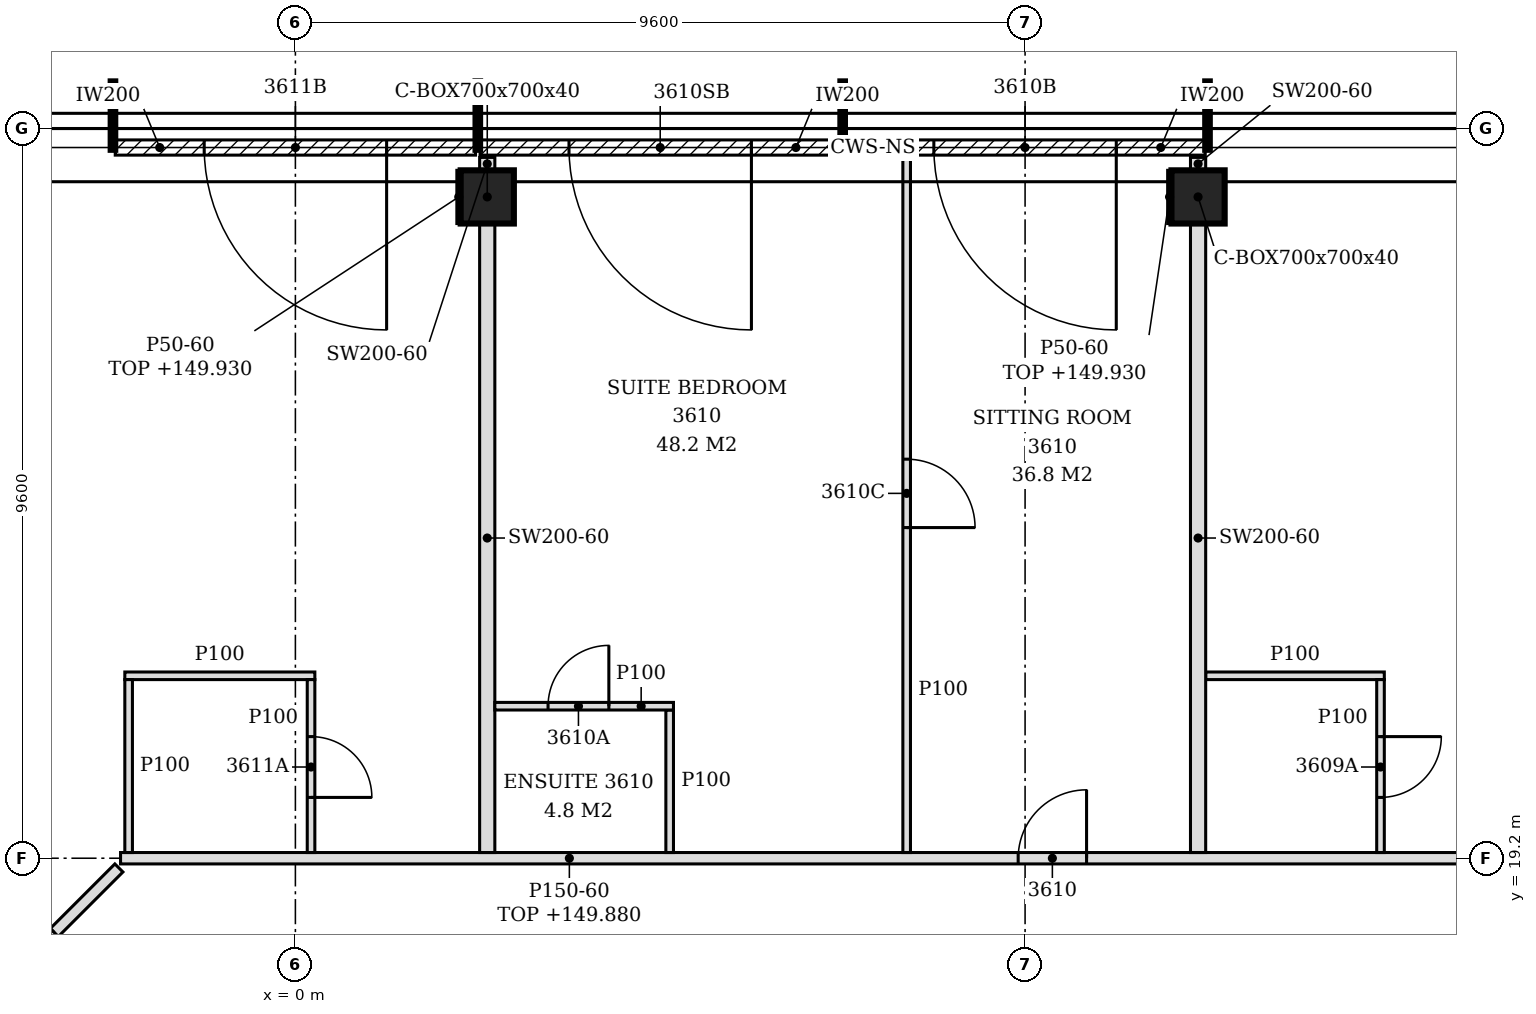
"""IFC4 building model, lengths in metres.
Left out: names, types, materials, properties, quantities, classifications, styles, units other than length and angle.
Written with IfcOpenShell. Run it as: python <this file> out.ifc"""

import sys

from ifc_helpers import new_model, si_unit, direction, frame, frame_2d, origin, origin_2d, place, context, subcontext, project, spatial, polyline, rectangle, hollow_rectangle, outline, extrude, element, fill, save


model = new_model("IFC4")
c1 = context("Model", 3, precision=1e-05, world=origin(), true_north=direction((0.0, 1.0)))
c2 = subcontext(c1, "Body", "Model", "MODEL_VIEW")
j1 = project(units=[si_unit("LENGTHUNIT", "METRE"), si_unit("PLANEANGLEUNIT", "RADIAN")], contexts=[c1])
p1 = place(None, origin())
s1 = spatial("IfcSite", under=j1, at=p1, CompositionType="ELEMENT")
p2 = place(p1, origin())
s2 = spatial("IfcBuilding", under=s1, at=p2, CompositionType="ELEMENT")
p3 = place(p2, frame((0.0, 0.0, 147.0)))
s3 = spatial("IfcBuildingStorey", under=s2, at=p3, CompositionType="ELEMENT", Elevation=147.0)
for number, where, z_axis, x_axis in (
    (1, (11.876, 27.9, -0.15), (0.0, 0.0, 1.0), (1.0, 0.0, 0.0)),
    (2, (2.524, 27.9, -0.15), (0.0, 0.0, 1.0), (1.0, 0.0, 0.0)),
):
    element("IfcColumn", number, at=place(p3, frame(where, z_axis=z_axis, x_axis=x_axis)), inside=s3, PredefinedType="COLUMN", context=c2, shape_type="SweptSolid", body=[
        extrude(hollow_rectangle(XDim=0.7, YDim=0.7, WallThickness=0.04, at=origin_2d()), origin(), (0.0, 0.0, 1.0), 3.6),
    ])
p4 = place(p3, frame((11.97, 28.55, 0.0), z_axis=(0.0, 0.0, 1.0), x_axis=(-1.0, 0.0, 0.0)))
e3 = element("IfcWall", 3, at=p4, inside=s3, PredefinedType="NOTDEFINED", context=c2, shape_type="SweptSolid", body=[
    extrude(rectangle(XDim=4.74, YDim=0.2, at=frame_2d((2.37, 0.0))), origin(), (0.0, 0.0, 1.0), 3.45),
])
p5 = place(p4, frame((1.17, 0.0, 0.0)))
e4 = element("IfcOpeningElement", 4, at=p5, cuts=e3, PredefinedType="OPENING", context=c2, shape_type="SweptSolid", body=[
    extrude(rectangle(XDim=2.4, YDim=2.4, at=frame_2d((1.2, 1.2))), frame((0.0, 0.11, 0.0), z_axis=(0.0, -1.0, 0.0), x_axis=(1.0, 0.0, 0.0)), (0.0, 0.0, 1.0), 0.22),
])
p6 = place(p3, frame((7.17, 28.55, 0.0), z_axis=(0.0, 0.0, 1.0), x_axis=(-1.0, 0.0, 0.0)))
e5 = element("IfcWall", 5, at=p6, inside=s3, PredefinedType="NOTDEFINED", context=c2, shape_type="SweptSolid", body=[
    extrude(rectangle(XDim=4.74, YDim=0.2, at=frame_2d((2.37, 0.0))), origin(), (0.0, 0.0, 1.0), 3.45),
])
p7 = place(p6, frame((1.17, 0.0, 0.0)))
e6 = element("IfcOpeningElement", 6, at=p7, cuts=e5, PredefinedType="OPENING", context=c2, shape_type="SweptSolid", body=[
    extrude(rectangle(XDim=2.4, YDim=2.4, at=frame_2d((1.2, 1.2))), frame((0.0, 0.11, 0.0), z_axis=(0.0, -1.0, 0.0), x_axis=(1.0, 0.0, 0.0)), (0.0, 0.0, 1.0), 0.22),
])
p8 = place(p3, frame((2.37, 28.55, 0.0), z_axis=(0.0, 0.0, 1.0), x_axis=(-1.0, 0.0, 0.0)))
e7 = element("IfcWall", 7, at=p8, inside=s3, PredefinedType="NOTDEFINED", context=c2, shape_type="SweptSolid", body=[
    extrude(rectangle(XDim=4.74, YDim=0.2, at=frame_2d((2.37, 0.0))), origin(), (0.0, 0.0, 1.0), 3.45),
])
p9 = place(p8, frame((1.17, 0.0, 0.0)))
e8 = element("IfcOpeningElement", 8, at=p9, cuts=e7, PredefinedType="OPENING", context=c2, shape_type="SweptSolid", body=[
    extrude(rectangle(XDim=2.4, YDim=2.4, at=frame_2d((1.2, 1.2))), frame((0.0, 0.11, 0.0), z_axis=(0.0, -1.0, 0.0), x_axis=(1.0, 0.0, 0.0)), (0.0, 0.0, 1.0), 0.22),
])
p10 = place(p3, frame((-12.075, 9.319, 0.0), z_axis=(0.0, 0.0, 1.0), x_axis=(0.707106781187, 0.707106781187, 0.0)))
e9 = element("IfcWall", 9, at=p10, inside=s3, PredefinedType="PARTITIONING", context=c2, shape_type="SweptSolid", body=[
    extrude(rectangle(XDim=13.793, YDim=0.15, at=frame_2d((6.896, 0.0))), origin(), (0.0, 0.0, 1.0), 2.73),
])
p11 = place(p10, frame((11.692, 0.0, 0.0)))
e10 = element("IfcOpeningElement", 10, at=p11, cuts=e9, PredefinedType="OPENING", context=c2, shape_type="SweptSolid", body=[
    extrude(rectangle(XDim=0.9, YDim=2.1, at=frame_2d((0.45, 1.05))), frame((0.0, 0.085, 0.0), z_axis=(0.0, -1.0, 0.0), x_axis=(1.0, 0.0, 0.0)), (0.0, 0.0, 1.0), 0.17),
])
p12 = place(p10, frame((7.376, 0.0, 0.0)))
e11 = element("IfcOpeningElement", 11, at=p12, cuts=e9, PredefinedType="OPENING", context=c2, shape_type="SweptSolid", body=[
    extrude(rectangle(XDim=0.9, YDim=2.1, at=frame_2d((0.45, 1.05))), frame((0.0, 0.085, 0.0), z_axis=(0.0, -1.0, 0.0), x_axis=(1.0, 0.0, 0.0)), (0.0, 0.0, 1.0), 0.17),
])
p13 = place(p10, frame((3.62, 0.0, 0.0)))
e12 = element("IfcOpeningElement", 12, at=p13, cuts=e9, PredefinedType="OPENING", context=c2, shape_type="SweptSolid", body=[
    extrude(rectangle(XDim=0.9, YDim=2.1, at=frame_2d((0.45, 1.05))), frame((0.0, 0.085, 0.0), z_axis=(0.0, -1.0, 0.0), x_axis=(1.0, 0.0, 0.0)), (0.0, 0.0, 1.0), 0.17),
])
p14 = place(p3, frame((-2.3, 19.2, 0.0), z_axis=(0.0, 0.0, 1.0), x_axis=(1.0, 0.0, 0.0)))
e13 = element("IfcWall", 13, at=p14, inside=s3, PredefinedType="PARTITIONING", context=c2, shape_type="SweptSolid", body=[
    extrude(outline(polyline([(0.0, 0.0), (19.0, 0.0), (19.0, 2.88), (9.65, 2.88), (9.648, 2.73), (9.35, 2.73), (9.348, 2.88), (0.0, 2.88), (0.0, 0.0)])), frame((0.0, 0.075, 0.0), z_axis=(0.0, -1.0, 0.0), x_axis=(1.0, 0.0, 0.0)), (0.0, 0.0, 1.0), 0.15),
])
p15 = place(p14, frame((11.809, 0.0, 0.0)))
e14 = element("IfcOpeningElement", 14, at=p15, cuts=e13, PredefinedType="OPENING", context=c2, shape_type="SweptSolid", body=[
    extrude(rectangle(XDim=0.9, YDim=2.1, at=frame_2d((0.45, 1.05))), frame((0.0, 0.085, 0.0), z_axis=(0.0, -1.0, 0.0), x_axis=(1.0, 0.0, 0.0)), (0.0, 0.0, 1.0), 0.17),
])
p16 = place(p3, frame((-2.194, 19.275, 0.0), z_axis=(0.0, 0.0, 1.0), x_axis=(0.0, 1.0, 0.0)))
e15 = element("IfcWall", 15, at=p16, inside=s3, PredefinedType="PARTITIONING", context=c2, shape_type="SweptSolid", body=[
    extrude(outline(polyline([(0.0, 0.0), (2.275, 0.0), (2.275, 3.45), (0.03, 3.45), (0.028, 2.88), (0.0, 2.88), (0.0, 0.0)])), frame((0.0, 0.05, 0.0), z_axis=(0.0, -1.0, 0.0), x_axis=(1.0, 0.0, 0.0)), (0.0, 0.0, 1.0), 0.1),
])
p17 = place(p3, frame((0.206, 19.275, 0.0), z_axis=(0.0, 0.0, 1.0), x_axis=(0.0, 1.0, 0.0)))
e16 = element("IfcWall", 16, at=p17, inside=s3, PredefinedType="PARTITIONING", context=c2, shape_type="SweptSolid", body=[
    extrude(outline(polyline([(0.0, 0.0), (2.275, 0.0), (2.275, 3.45), (0.03, 3.45), (0.028, 2.88), (0.0, 2.88), (0.0, 0.0)])), frame((0.0, 0.05, 0.0), z_axis=(0.0, -1.0, 0.0), x_axis=(1.0, 0.0, 0.0)), (0.0, 0.0, 1.0), 0.1),
])
p18 = place(p17, frame((0.725, 0.0, 0.0)))
e17 = element("IfcOpeningElement", 17, at=p18, cuts=e16, PredefinedType="OPENING", context=c2, shape_type="SweptSolid", body=[
    extrude(rectangle(XDim=0.8, YDim=2.1, at=frame_2d((0.4, 1.05))), frame((0.0, 0.06, 0.0), z_axis=(0.0, -1.0, 0.0), x_axis=(1.0, 0.0, 0.0)), (0.0, 0.0, 1.0), 0.12),
])
p19 = place(p3, frame((2.524, 19.275, 0.0), z_axis=(0.0, 0.0, 1.0), x_axis=(0.0, 1.0, 0.0)))
e18 = element("IfcWall", 18, at=p19, inside=s3, PredefinedType="PARTITIONING", context=c2, shape_type="SweptSolid", body=[
    extrude(outline(polyline([(0.0, 0.0), (8.275, 0.0), (8.275, 3.45), (4.83, 3.45), (4.828, 2.88), (4.62, 2.88), (4.618, 3.45), (0.03, 3.45), (0.028, 2.88), (0.0, 2.88), (0.0, 0.0)])), frame((0.0, 0.1, 0.0), z_axis=(0.0, -1.0, 0.0), x_axis=(1.0, 0.0, 0.0)), (0.0, 0.0, 1.0), 0.2),
])
p20 = place(p3, frame((4.924, 19.275, 0.0), z_axis=(0.0, 0.0, 1.0), x_axis=(0.0, 1.0, 0.0)))
e19 = element("IfcWall", 19, at=p20, inside=s3, PredefinedType="PARTITIONING", context=c2, shape_type="SweptSolid", body=[
    extrude(outline(polyline([(0.0, 0.0), (1.875, 0.0), (1.875, 3.45), (0.03, 3.45), (0.028, 2.88), (0.0, 2.88), (0.0, 0.0)])), frame((0.0, 0.05, 0.0), z_axis=(0.0, -1.0, 0.0), x_axis=(1.0, 0.0, 0.0)), (0.0, 0.0, 1.0), 0.1),
])
p21 = place(p3, frame((8.042, 19.275, 0.0), z_axis=(0.0, 0.0, 1.0), x_axis=(0.0, 1.0, 0.0)))
e20 = element("IfcWall", 20, at=p21, inside=s3, PredefinedType="PARTITIONING", context=c2, shape_type="SweptSolid", body=[
    extrude(outline(polyline([(0.0, 0.0), (9.145, 0.0), (9.145, 3.45), (8.775, 3.45), (8.773, 2.93), (8.475, 2.93), (8.473, 3.45), (4.83, 3.45), (4.828, 2.88), (4.62, 2.88), (4.618, 3.45), (0.03, 3.45), (0.028, 2.88), (0.0, 2.88), (0.0, 0.0)])), frame((0.0, 0.05, 0.0), z_axis=(0.0, -1.0, 0.0), x_axis=(1.0, 0.0, 0.0)), (0.0, 0.0, 1.0), 0.1),
])
p22 = place(p21, frame((4.275, 0.0, 0.0)))
e21 = element("IfcOpeningElement", 21, at=p22, cuts=e20, PredefinedType="OPENING", context=c2, shape_type="SweptSolid", body=[
    extrude(rectangle(XDim=0.9, YDim=2.1, at=frame_2d((0.45, 1.05))), frame((0.0, 0.06, 0.0), z_axis=(0.0, -1.0, 0.0), x_axis=(1.0, 0.0, 0.0)), (0.0, 0.0, 1.0), 0.12),
])
p23 = place(p3, frame((11.876, 19.275, 0.0), z_axis=(0.0, 0.0, 1.0), x_axis=(0.0, 1.0, 0.0)))
e22 = element("IfcWall", 22, at=p23, inside=s3, PredefinedType="PARTITIONING", context=c2, shape_type="SweptSolid", body=[
    extrude(outline(polyline([(0.0, 0.0), (8.275, 0.0), (8.275, 3.45), (4.83, 3.45), (4.828, 2.88), (4.62, 2.88), (4.618, 3.45), (0.03, 3.45), (0.028, 2.88), (0.0, 2.88), (0.0, 0.0)])), frame((0.0, 0.1, 0.0), z_axis=(0.0, -1.0, 0.0), x_axis=(1.0, 0.0, 0.0)), (0.0, 0.0, 1.0), 0.2),
])
p24 = place(p3, frame((14.276, 19.275, 0.0), z_axis=(0.0, 0.0, 1.0), x_axis=(0.0, 1.0, 0.0)))
e23 = element("IfcWall", 23, at=p24, inside=s3, PredefinedType="PARTITIONING", context=c2, shape_type="SweptSolid", body=[
    extrude(outline(polyline([(0.0, 0.0), (2.275, 0.0), (2.275, 3.45), (0.03, 3.45), (0.028, 2.88), (0.0, 2.88), (0.0, 0.0)])), frame((0.0, 0.05, 0.0), z_axis=(0.0, -1.0, 0.0), x_axis=(1.0, 0.0, 0.0)), (0.0, 0.0, 1.0), 0.1),
])
p25 = place(p24, frame((0.725, 0.0, 0.0)))
e24 = element("IfcOpeningElement", 24, at=p25, cuts=e23, PredefinedType="OPENING", context=c2, shape_type="SweptSolid", body=[
    extrude(rectangle(XDim=0.8, YDim=2.1, at=frame_2d((0.4, 1.05))), frame((0.0, 0.06, 0.0), z_axis=(0.0, -1.0, 0.0), x_axis=(1.0, 0.0, 0.0)), (0.0, 0.0, 1.0), 0.12),
])
p26 = place(p3, frame((2.624, 21.2, 0.0), z_axis=(0.0, 0.0, 1.0), x_axis=(1.0, 0.0, 0.0)))
e25 = element("IfcWall", 25, at=p26, inside=s3, PredefinedType="PARTITIONING", context=c2, shape_type="SweptSolid", body=[
    extrude(rectangle(XDim=2.35, YDim=0.1, at=frame_2d((1.175, 0.0))), origin(), (0.0, 0.0, 1.0), 3.45),
])
p27 = place(p26, frame((0.7, 0.0, 0.0)))
e26 = element("IfcOpeningElement", 26, at=p27, cuts=e25, PredefinedType="OPENING", context=c2, shape_type="SweptSolid", body=[
    extrude(rectangle(XDim=0.8, YDim=2.1, at=frame_2d((0.4, 1.05))), frame((0.0, 0.06, 0.0), z_axis=(0.0, -1.0, 0.0), x_axis=(1.0, 0.0, 0.0)), (0.0, 0.0, 1.0), 0.12),
])
p28 = place(p3, frame((-2.244, 21.6, 0.0), z_axis=(0.0, 0.0, 1.0), x_axis=(1.0, 0.0, 0.0)))
e27 = element("IfcWall", 27, at=p28, inside=s3, PredefinedType="PARTITIONING", context=c2, shape_type="SweptSolid", body=[
    extrude(rectangle(XDim=2.5, YDim=0.1, at=frame_2d((1.25, 0.0))), origin(), (0.0, 0.0, 1.0), 3.45),
])
p29 = place(p3, frame((11.976, 21.6, 0.0), z_axis=(0.0, 0.0, 1.0), x_axis=(1.0, 0.0, 0.0)))
e28 = element("IfcWall", 28, at=p29, inside=s3, PredefinedType="PARTITIONING", context=c2, shape_type="SweptSolid", body=[
    extrude(rectangle(XDim=2.35, YDim=0.1, at=frame_2d((1.175, 0.0))), origin(), (0.0, 0.0, 1.0), 3.45),
])
for number, where, z_axis, x_axis in (
    (29, (2.524, 28.25, 0.0), (0.0, 0.0, 1.0), (0.0, 1.0, 0.0)),
    (30, (11.876, 28.25, 0.0), (0.0, 0.0, 1.0), (0.0, 1.0, 0.0)),
):
    element("IfcWall", number, at=place(p3, frame(where, z_axis=z_axis, x_axis=x_axis)), inside=s3, PredefinedType="PARTITIONING", context=c2, shape_type="SweptSolid", body=[
        extrude(rectangle(XDim=0.17, YDim=0.2, at=frame_2d((0.085, 0.0))), origin(), (0.0, 0.0, 1.0), 3.45),
    ])
for number, where, z_axis, x_axis in (
    (31, (2.149, 27.55, 0.0), (0.0, 0.0, 1.0), (0.0, 1.0, 0.0)),
    (32, (11.501, 27.55, 0.0), (0.0, 0.0, 1.0), (0.0, 1.0, 0.0)),
):
    element("IfcWall", number, at=place(p3, frame(where, z_axis=z_axis, x_axis=x_axis)), inside=s3, PredefinedType="PARTITIONING", context=c2, shape_type="SweptSolid", body=[
        extrude(rectangle(XDim=0.7, YDim=0.05, at=frame_2d((0.35, 0.0))), origin(), (0.0, 0.0, 1.0), 2.93),
    ])
p30 = place(p5, origin())
e33 = element("IfcDoor", 33, at=p30, inside=s3, OperationType="SINGLE_SWING_LEFT", PredefinedType="DOOR", context=c2, shape_type="SweptSolid", body=[
    extrude(rectangle(XDim=2.4, YDim=2.4, at=frame_2d((1.2, 1.2))), frame((0.0, 0.025, 0.0), z_axis=(0.0, -1.0, 0.0), x_axis=(1.0, 0.0, 0.0)), (0.0, 0.0, 1.0), 0.05),
])
fill(e4, e33)
p31 = place(p7, origin())
e34 = element("IfcDoor", 34, at=p31, inside=s3, OperationType="SINGLE_SWING_LEFT", PredefinedType="DOOR", context=c2, shape_type="SweptSolid", body=[
    extrude(rectangle(XDim=2.4, YDim=2.4, at=frame_2d((1.2, 1.2))), frame((0.0, 0.025, 0.0), z_axis=(0.0, -1.0, 0.0), x_axis=(1.0, 0.0, 0.0)), (0.0, 0.0, 1.0), 0.05),
])
fill(e6, e34)
p32 = place(p9, origin())
e35 = element("IfcDoor", 35, at=p32, inside=s3, OperationType="SINGLE_SWING_LEFT", PredefinedType="DOOR", context=c2, shape_type="SweptSolid", body=[
    extrude(rectangle(XDim=2.4, YDim=2.4, at=frame_2d((1.2, 1.2))), frame((0.0, 0.025, 0.0), z_axis=(0.0, -1.0, 0.0), x_axis=(1.0, 0.0, 0.0)), (0.0, 0.0, 1.0), 0.05),
])
fill(e8, e35)
p33 = place(p25, frame((0.8, 0.0, 0.0), z_axis=(0.0, 0.0, 1.0), x_axis=(-1.0, 0.0, 0.0)))
e36 = element("IfcDoor", 36, at=p33, inside=s3, OperationType="SINGLE_SWING_LEFT", PredefinedType="DOOR", context=c2, shape_type="SweptSolid", body=[
    extrude(rectangle(XDim=0.8, YDim=2.1, at=frame_2d((0.4, 1.05))), frame((0.0, 0.025, 0.0), z_axis=(0.0, -1.0, 0.0), x_axis=(1.0, 0.0, 0.0)), (0.0, 0.0, 1.0), 0.05),
])
fill(e24, e36)
p34 = place(p15, origin())
e37 = element("IfcDoor", 37, at=p34, inside=s3, OperationType="SINGLE_SWING_RIGHT", PredefinedType="DOOR", context=c2, shape_type="SweptSolid", body=[
    extrude(rectangle(XDim=0.9, YDim=2.1, at=frame_2d((0.45, 1.05))), frame((0.0, 0.025, 0.0), z_axis=(0.0, -1.0, 0.0), x_axis=(1.0, 0.0, 0.0)), (0.0, 0.0, 1.0), 0.05),
])
fill(e14, e37)
p35 = place(p22, frame((0.9, 0.0, 0.0), z_axis=(0.0, 0.0, 1.0), x_axis=(-1.0, 0.0, 0.0)))
e38 = element("IfcDoor", 38, at=p35, inside=s3, OperationType="SINGLE_SWING_RIGHT", PredefinedType="DOOR", context=c2, shape_type="SweptSolid", body=[
    extrude(rectangle(XDim=0.9, YDim=2.1, at=frame_2d((0.45, 1.05))), frame((0.0, 0.025, 0.0), z_axis=(0.0, -1.0, 0.0), x_axis=(1.0, 0.0, 0.0)), (0.0, 0.0, 1.0), 0.05),
])
fill(e21, e38)
p36 = place(p27, origin())
e39 = element("IfcDoor", 39, at=p36, inside=s3, OperationType="SINGLE_SWING_RIGHT", PredefinedType="DOOR", context=c2, shape_type="SweptSolid", body=[
    extrude(rectangle(XDim=0.8, YDim=2.1, at=frame_2d((0.4, 1.05))), frame((0.0, 0.025, 0.0), z_axis=(0.0, -1.0, 0.0), x_axis=(1.0, 0.0, 0.0)), (0.0, 0.0, 1.0), 0.05),
])
fill(e26, e39)
p37 = place(p11, origin())
e40 = element("IfcDoor", 40, at=p37, inside=s3, OperationType="SINGLE_SWING_RIGHT", PredefinedType="DOOR", context=c2, shape_type="SweptSolid", body=[
    extrude(rectangle(XDim=0.9, YDim=2.1, at=frame_2d((0.45, 1.05))), frame((0.0, 0.025, 0.0), z_axis=(0.0, -1.0, 0.0), x_axis=(1.0, 0.0, 0.0)), (0.0, 0.0, 1.0), 0.05),
])
fill(e10, e40)
p38 = place(p18, frame((0.8, 0.0, 0.0), z_axis=(0.0, 0.0, 1.0), x_axis=(-1.0, 0.0, 0.0)))
e41 = element("IfcDoor", 41, at=p38, inside=s3, OperationType="SINGLE_SWING_RIGHT", PredefinedType="DOOR", context=c2, shape_type="SweptSolid", body=[
    extrude(rectangle(XDim=0.8, YDim=2.1, at=frame_2d((0.4, 1.05))), frame((0.0, 0.025, 0.0), z_axis=(0.0, -1.0, 0.0), x_axis=(1.0, 0.0, 0.0)), (0.0, 0.0, 1.0), 0.05),
])
fill(e17, e41)
save(model, sys.argv[1])
